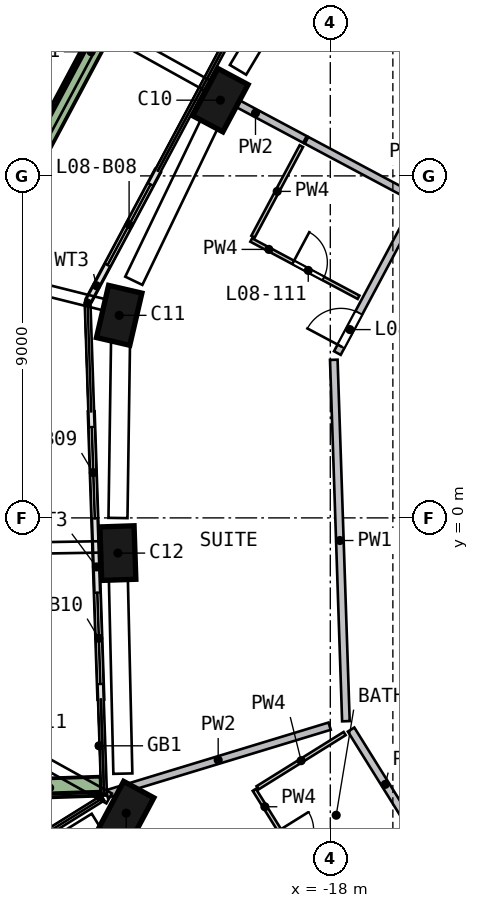
"""IFC4 building model, lengths in metres.
Left out: names, types, materials, properties, quantities, classifications, styles, units other than length and angle.
Written with IfcOpenShell. Run it as: python <this file> out.ifc"""

import sys

from ifc_helpers import new_model, si_unit, direction, frame, frame_2d, origin, origin_2d, place, context, subcontext, project, spatial, rectangle, extrude, element, fill, save


model = new_model("IFC4")
c1 = context("Model", 3, precision=1e-05, world=origin(), true_north=direction((0.0, 1.0)))
c2 = subcontext(c1, "Body", "Model", "MODEL_VIEW")
j1 = project(units=[si_unit("LENGTHUNIT", "METRE"), si_unit("PLANEANGLEUNIT", "RADIAN")], contexts=[c1])
p1 = place(None, origin())
s1 = spatial("IfcSite", under=j1, at=p1, CompositionType="ELEMENT")
p2 = place(p1, origin())
s2 = spatial("IfcBuilding", under=s1, at=p2, CompositionType="ELEMENT")
p3 = place(p2, frame((0.0, 0.0, 42.5)))
s3 = spatial("IfcBuildingStorey", under=s2, at=p3, CompositionType="ELEMENT", Elevation=42.5)
p4 = place(p3, frame((-20.829, 11.113, 0.0), z_axis=(-0.052094183, -0.099549321, 0.993668017), x_axis=(-0.468171177, -0.876466072, -0.112352009)))
e1 = element("IfcColumn", 1, at=p4, inside=s3, PredefinedType="COLUMN", context=c2, shape_type="SweptSolid", body=[
    extrude(rectangle(XDim=1.4, YDim=0.9, at=origin_2d()), origin(), (0.0, 0.0, 1.0), 3.21),
])
p5 = place(p3, frame((-23.525, 5.466, 0.0), z_axis=(-0.025013102, -0.112140805, 0.993377463), x_axis=(0.22448272, 0.967681369, 0.114892456)))
e2 = element("IfcColumn", 2, at=p5, inside=s3, PredefinedType="COLUMN", context=c2, shape_type="SweptSolid", body=[
    extrude(rectangle(XDim=1.4, YDim=0.9, at=origin_2d()), origin(), (0.0, 0.0, 1.0), 3.211),
])
p6 = place(p3, frame((-23.595, -0.791, 0.0), z_axis=(0.004715138, -0.112174655, 0.993677319), x_axis=(0.033305651, -0.993119451, -0.112269718)))
e3 = element("IfcColumn", 3, at=p6, inside=s3, PredefinedType="COLUMN", context=c2, shape_type="SweptSolid", body=[
    extrude(rectangle(XDim=1.4, YDim=0.9, at=origin_2d()), origin(), (0.0, 0.0, 1.0), 3.21),
])
p7 = place(p3, frame((-23.416, -7.635, 0.0), z_axis=(0.037244102, -0.110972223, 0.993125391), x_axis=(0.475039449, 0.876310904, 0.080104438)))
e4 = element("IfcColumn", 4, at=p7, inside=s3, PredefinedType="COLUMN", context=c2, shape_type="SweptSolid", body=[
    extrude(rectangle(XDim=1.4, YDim=0.9, at=origin_2d()), origin(), (0.0, 0.0, 1.0), 3.212),
])
p8 = place(p3, frame((-22.541, 9.126, 0.0), z_axis=(0.0, 0.0, 1.0), x_axis=(-0.470723468, -0.882280804, 0.0)))
e5 = element("IfcWall", 5, at=p8, inside=s3, PredefinedType="SOLIDWALL", context=c2, shape_type="SweptSolid", body=[
    extrude(rectangle(XDim=3.842, YDim=0.15, at=frame_2d((1.921, 0.0))), origin(), (0.0, 0.0, 1.0), 2.425),
])
p9 = place(p8, frame((0.4, 0.0, 0.0)))
e6 = element("IfcOpeningElement", 6, at=p9, cuts=e5, PredefinedType="OPENING", context=c2, shape_type="SweptSolid", body=[
    extrude(rectangle(XDim=2.4, YDim=2.4, at=frame_2d((1.2, 1.2))), frame((0.0, 0.085, 0.0), z_axis=(0.0, -1.0, 0.0), x_axis=(1.0, 0.0, 0.0)), (0.0, 0.0, 1.0), 0.17),
])
p10 = place(p3, frame((-24.29, 2.788, 0.0), z_axis=(0.0, 0.0, 1.0), x_axis=(0.033499981, -0.999438718, 0.0)))
e7 = element("IfcWall", 7, at=p10, inside=s3, PredefinedType="SOLIDWALL", context=c2, shape_type="SweptSolid", body=[
    extrude(rectangle(XDim=3.6, YDim=0.15, at=frame_2d((1.8, 0.0))), origin(), (0.0, 0.0, 1.0), 2.425),
])
p11 = place(p10, frame((0.4, 0.0, 0.0)))
e8 = element("IfcOpeningElement", 8, at=p11, cuts=e7, PredefinedType="OPENING", context=c2, shape_type="SweptSolid", body=[
    extrude(rectangle(XDim=2.4, YDim=2.4, at=frame_2d((1.2, 1.2))), frame((0.0, 0.085, 0.0), z_axis=(0.0, -1.0, 0.0), x_axis=(1.0, 0.0, 0.0)), (0.0, 0.0, 1.0), 0.17),
])
p12 = place(p3, frame((-24.17, -0.81, 0.0), z_axis=(0.0, 0.0, 1.0), x_axis=(0.033472875, -0.999439626, 0.0)))
e9 = element("IfcWall", 9, at=p12, inside=s3, PredefinedType="SOLIDWALL", context=c2, shape_type="SweptSolid", body=[
    extrude(rectangle(XDim=3.96, YDim=0.15, at=frame_2d((1.98, 0.0))), origin(), (0.0, 0.0, 1.0), 2.425),
])
p13 = place(p12, frame((1.16, 0.0, 0.0)))
e10 = element("IfcOpeningElement", 10, at=p13, cuts=e9, PredefinedType="OPENING", context=c2, shape_type="SweptSolid", body=[
    extrude(rectangle(XDim=2.4, YDim=2.4, at=frame_2d((1.2, 1.2))), frame((0.0, 0.085, 0.0), z_axis=(0.0, -1.0, 0.0), x_axis=(1.0, 0.0, 0.0)), (0.0, 0.0, 1.0), 0.17),
])
p14 = place(p3, frame((-21.181, 18.101, 0.0), z_axis=(0.0, 0.0, 1.0), x_axis=(-0.470704182, -0.882291093, 0.0)))
e11 = element("IfcWall", 11, at=p14, inside=s3, PredefinedType="SOLIDWALL", context=c2, shape_type="SweptSolid", body=[
    extrude(rectangle(XDim=13.224, YDim=0.5, at=frame_2d((6.612, 0.0))), origin(), (0.0, 0.0, 1.0), 0.7),
])
p15 = place(p3, frame((-26.734, -7.15, 0.0), z_axis=(0.0, 0.0, 1.0), x_axis=(0.999439775, 0.033468433, 0.0)))
e12 = element("IfcWall", 12, at=p15, inside=s3, PredefinedType="SOLIDWALL", context=c2, shape_type="SweptSolid", body=[
    extrude(rectangle(XDim=2.699, YDim=0.5, at=frame_2d((1.35, 0.0))), origin(), (0.0, 0.0, 1.0), 0.7),
])
p16 = place(p3, frame((-17.908, 4.16, 0.0), z_axis=(0.0, 0.0, 1.0), x_axis=(0.033506179, -0.99943851, 0.0)))
e13 = element("IfcWall", 13, at=p16, inside=s3, PredefinedType="SOLIDWALL", context=c2, shape_type="SweptSolid", body=[
    extrude(rectangle(XDim=9.516, YDim=0.2, at=frame_2d((4.758, 0.0))), origin(), (0.0, 0.0, 1.0), 3.19),
])
p17 = place(p3, frame((-17.452, -5.57, 0.0), z_axis=(0.0, 0.0, 1.0), x_axis=(0.528700987, -0.848808145, 0.0)))
e14 = element("IfcWall", 14, at=p17, inside=s3, PredefinedType="SOLIDWALL", context=c2, shape_type="SweptSolid", body=[
    extrude(rectangle(XDim=3.4, YDim=0.2, at=frame_2d((1.7, 0.0))), origin(), (0.0, 0.0, 1.0), 3.19),
])
p18 = place(p3, frame((-17.813, 4.338, 0.0), z_axis=(0.0, 0.0, 1.0), x_axis=(0.470711952, 0.882286948, 0.0)))
e15 = element("IfcWall", 15, at=p18, inside=s3, PredefinedType="SOLIDWALL", context=c2, shape_type="SweptSolid", body=[
    extrude(rectangle(XDim=9.115, YDim=0.2, at=frame_2d((4.558, 0.0))), origin(), (0.0, 0.0, 1.0), 3.19),
])
p19 = place(p18, frame((0.2, 0.0, 0.0)))
e16 = element("IfcOpeningElement", 16, at=p19, cuts=e15, PredefinedType="OPENING", context=c2, shape_type="SweptSolid", body=[
    extrude(rectangle(XDim=1.0, YDim=2.1, at=frame_2d((0.5, 1.05))), frame((0.0, 0.11, 0.0), z_axis=(0.0, -1.0, 0.0), x_axis=(1.0, 0.0, 0.0)), (0.0, 0.0, 1.0), 0.22),
])
p20 = place(p3, frame((-18.017, -5.481, 0.0), z_axis=(0.0, 0.0, 1.0), x_axis=(-0.956709073, -0.291045958, 0.0)))
e17 = element("IfcWall", 17, at=p20, inside=s3, PredefinedType="SOLIDWALL", context=c2, shape_type="SweptSolid", body=[
    extrude(rectangle(XDim=6.132, YDim=0.2, at=frame_2d((3.066, 0.0))), origin(), (0.0, 0.0, 1.0), 3.19),
])
p21 = place(p3, frame((-18.666, 9.958, 0.0), z_axis=(0.0, 0.0, 1.0), x_axis=(-0.882304858, 0.470678379, 0.0)))
e18 = element("IfcWall", 18, at=p21, inside=s3, PredefinedType="SOLIDWALL", context=c2, shape_type="SweptSolid", body=[
    extrude(rectangle(XDim=2.952, YDim=0.2, at=frame_2d((1.476, 0.0))), origin(), (0.0, 0.0, 1.0), 3.19),
])
p22 = place(p3, frame((-16.062, 8.569, 0.0), z_axis=(0.0, 0.0, 1.0), x_axis=(-0.882280811, 0.470723454, 0.0)))
e19 = element("IfcWall", 19, at=p22, inside=s3, PredefinedType="SOLIDWALL", context=c2, shape_type="SweptSolid", body=[
    extrude(rectangle(XDim=2.905, YDim=0.2, at=frame_2d((1.453, 0.0))), origin(), (0.0, 0.0, 1.0), 3.19),
])
p23 = place(p3, frame((-20.033, 7.401, 0.0), z_axis=(0.0, 0.0, 1.0), x_axis=(0.470710247, 0.882287858, 0.0)))
e20 = element("IfcWall", 20, at=p23, inside=s3, PredefinedType="PARTITIONING", context=c2, shape_type="SweptSolid", body=[
    extrude(rectangle(XDim=2.7, YDim=0.1, at=frame_2d((1.35, 0.0))), origin(), (0.0, 0.0, 1.0), 3.19),
])
p24 = place(p3, frame((-19.999, -7.156, 0.0), z_axis=(0.0, 0.0, 1.0), x_axis=(0.52869537, -0.848811643, 0.0)))
e21 = element("IfcWall", 21, at=p24, inside=s3, PredefinedType="PARTITIONING", context=c2, shape_type="SweptSolid", body=[
    extrude(rectangle(XDim=3.2, YDim=0.1, at=frame_2d((1.6, 0.0))), origin(), (0.0, 0.0, 1.0), 3.19),
])
p25 = place(p24, frame((1.25, 0.0, 0.0)))
e22 = element("IfcOpeningElement", 22, at=p25, cuts=e21, PredefinedType="OPENING", context=c2, shape_type="SweptSolid", body=[
    extrude(rectangle(XDim=0.9, YDim=2.1, at=frame_2d((0.45, 1.05))), frame((0.0, 0.06, 0.0), z_axis=(0.0, -1.0, 0.0), x_axis=(1.0, 0.0, 0.0)), (0.0, 0.0, 1.0), 0.12),
])
p26 = place(p3, frame((-19.914, -7.103, 0.0), z_axis=(0.0, 0.0, 1.0), x_axis=(0.848764455, 0.528771123, 0.0)))
e23 = element("IfcWall", 23, at=p26, inside=s3, PredefinedType="PARTITIONING", context=c2, shape_type="SweptSolid", body=[
    extrude(rectangle(XDim=2.7, YDim=0.1, at=frame_2d((1.35, 0.0))), origin(), (0.0, 0.0, 1.0), 3.19),
])
p27 = place(p3, frame((-20.08, 7.312, 0.0), z_axis=(0.0, 0.0, 1.0), x_axis=(0.882272674, -0.470738706, 0.0)))
e24 = element("IfcWall", 24, at=p27, inside=s3, PredefinedType="PARTITIONING", context=c2, shape_type="SweptSolid", body=[
    extrude(rectangle(XDim=3.2, YDim=0.1, at=frame_2d((1.6, 0.0))), origin(), (0.0, 0.0, 1.0), 3.19),
])
p28 = place(p27, frame((1.25, 0.0, 0.0)))
e25 = element("IfcOpeningElement", 25, at=p28, cuts=e24, PredefinedType="OPENING", context=c2, shape_type="SweptSolid", body=[
    extrude(rectangle(XDim=0.9, YDim=2.1, at=frame_2d((0.45, 1.05))), frame((0.0, 0.06, 0.0), z_axis=(0.0, -1.0, 0.0), x_axis=(1.0, 0.0, 0.0)), (0.0, 0.0, 1.0), 0.12),
])
p29 = place(p9, origin())
e26 = element("IfcDoor", 26, at=p29, inside=s3, OperationType="SLIDING_TO_RIGHT", PredefinedType="DOOR", context=c2, shape_type="SweptSolid", body=[
    extrude(rectangle(XDim=2.4, YDim=2.4, at=frame_2d((1.2, 1.2))), frame((0.0, 0.025, 0.0), z_axis=(0.0, -1.0, 0.0), x_axis=(1.0, 0.0, 0.0)), (0.0, 0.0, 1.0), 0.05),
])
fill(e6, e26)
p30 = place(p11, origin())
e27 = element("IfcDoor", 27, at=p30, inside=s3, OperationType="SLIDING_TO_RIGHT", PredefinedType="DOOR", context=c2, shape_type="SweptSolid", body=[
    extrude(rectangle(XDim=2.4, YDim=2.4, at=frame_2d((1.2, 1.2))), frame((0.0, 0.025, 0.0), z_axis=(0.0, -1.0, 0.0), x_axis=(1.0, 0.0, 0.0)), (0.0, 0.0, 1.0), 0.05),
])
fill(e8, e27)
p31 = place(p13, origin())
e28 = element("IfcDoor", 28, at=p31, inside=s3, OperationType="SLIDING_TO_LEFT", PredefinedType="DOOR", context=c2, shape_type="SweptSolid", body=[
    extrude(rectangle(XDim=2.4, YDim=2.4, at=frame_2d((1.2, 1.2))), frame((0.0, 0.025, 0.0), z_axis=(0.0, -1.0, 0.0), x_axis=(1.0, 0.0, 0.0)), (0.0, 0.0, 1.0), 0.05),
])
fill(e10, e28)
p32 = place(p19, origin())
e29 = element("IfcDoor", 29, at=p32, inside=s3, OperationType="SINGLE_SWING_LEFT", PredefinedType="DOOR", context=c2, shape_type="SweptSolid", body=[
    extrude(rectangle(XDim=1.0, YDim=2.1, at=frame_2d((0.5, 1.05))), frame((0.0, 0.025, 0.0), z_axis=(0.0, -1.0, 0.0), x_axis=(1.0, 0.0, 0.0)), (0.0, 0.0, 1.0), 0.05),
])
fill(e16, e29)
p33 = place(p28, origin())
e30 = element("IfcDoor", 30, at=p33, inside=s3, OperationType="SINGLE_SWING_LEFT", PredefinedType="DOOR", context=c2, shape_type="SweptSolid", body=[
    extrude(rectangle(XDim=0.9, YDim=2.1, at=frame_2d((0.45, 1.05))), frame((0.0, 0.025, 0.0), z_axis=(0.0, -1.0, 0.0), x_axis=(1.0, 0.0, 0.0)), (0.0, 0.0, 1.0), 0.05),
])
fill(e25, e30)
save(model, sys.argv[1])
